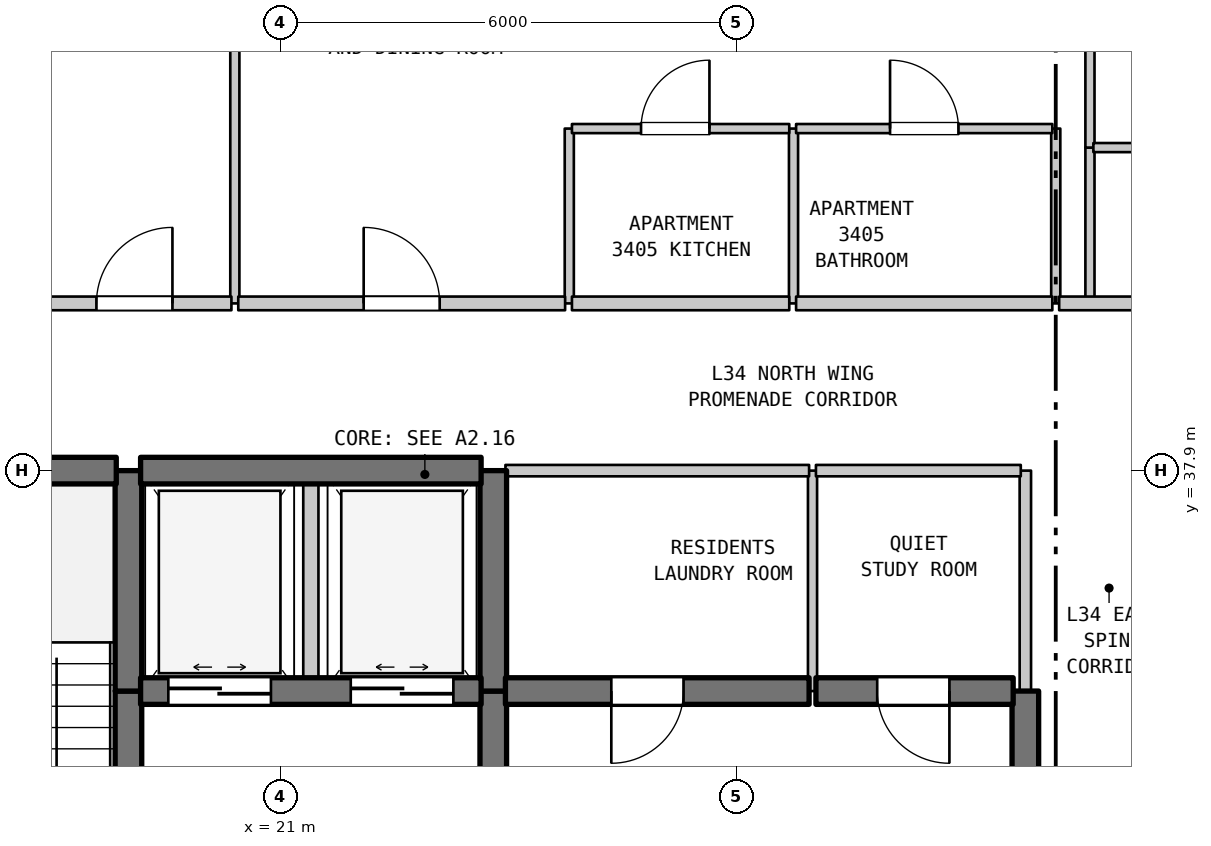
"""IFC4 building model, lengths in metres.
Left out: names, types, materials, properties, quantities, classifications, styles, units other than length and angle.
Written with IfcOpenShell. Run it as: python <this file> out.ifc"""

import sys

from ifc_helpers import new_model, si_unit, direction, frame, frame_2d, origin, place, context, subcontext, project, spatial, rectangle, extrude, element, fill, save


model = new_model("IFC4")
c1 = context("Model", 3, precision=1e-05, world=origin(), true_north=direction((0.0, 1.0)))
c2 = subcontext(c1, "Body", "Model", "MODEL_VIEW")
j1 = project(units=[si_unit("LENGTHUNIT", "METRE"), si_unit("PLANEANGLEUNIT", "RADIAN")], contexts=[c1])
p1 = place(None, origin())
s1 = spatial("IfcSite", under=j1, at=p1, CompositionType="ELEMENT")
p2 = place(p1, origin())
s2 = spatial("IfcBuilding", under=s1, at=p2, CompositionType="ELEMENT")
p3 = place(p2, frame((0.0, 0.0, 140.9)))
s3 = spatial("IfcBuildingStorey", under=s2, at=p3, CompositionType="ELEMENT", Elevation=140.9)
p4 = place(p3, frame((19.0, 29.5, 0.0), z_axis=(0.0, 0.0, 1.0), x_axis=(0.0, 1.0, 0.0)))
e1 = element("IfcWall", 1, at=p4, inside=s3, PredefinedType="SHEAR", context=c2, shape_type="SweptSolid", body=[
    extrude(rectangle(XDim=5.5, YDim=0.35, at=frame_2d((2.75, 0.0))), origin(), (0.0, 0.0, 1.0), 3.385),
])
p5 = place(p4, frame((2.025, 0.0, 0.0)))
e2 = element("IfcOpeningElement", 2, at=p5, cuts=e1, PredefinedType="OPENING", context=c2, shape_type="SweptSolid", body=[
    extrude(rectangle(XDim=1.1, YDim=2.15, at=frame_2d((0.55, 1.075))), frame((0.0, 0.185, 0.0), z_axis=(0.0, -1.0, 0.0), x_axis=(1.0, 0.0, 0.0)), (0.0, 0.0, 1.0), 0.37),
])
p6 = place(p3, frame((19.0, 35.0, 0.0), z_axis=(0.0, 0.0, 1.0), x_axis=(0.0, 1.0, 0.0)))
e3 = element("IfcWall", 3, at=p6, inside=s3, PredefinedType="SHEAR", context=c2, shape_type="SweptSolid", body=[
    extrude(rectangle(XDim=2.9, YDim=0.35, at=frame_2d((1.45, 0.0))), origin(), (0.0, 0.0, 1.0), 3.385),
])
p7 = place(p3, frame((20.4, 40.1, 0.0), z_axis=(0.0, 0.0, 1.0), x_axis=(0.0, 1.0, 0.0)))
e4 = element("IfcWall", 4, at=p7, inside=s3, PredefinedType="PARTITIONING", context=c2, shape_type="SweptSolid", body=[
    extrude(rectangle(XDim=13.79, YDim=0.12, at=frame_2d((6.895, 0.0))), origin(), (0.0, 0.0, 1.0), 3.385),
])
p8 = place(p3, frame((21.4, 35.0, 0.0), z_axis=(0.0, 0.0, 1.0), x_axis=(0.0, 1.0, 0.0)))
e5 = element("IfcWall", 5, at=p8, inside=s3, PredefinedType="STANDARD", context=c2, shape_type="SweptSolid", body=[
    extrude(rectangle(XDim=2.9, YDim=0.2, at=frame_2d((1.45, 0.0))), origin(), (0.0, 0.0, 1.0), 3.385),
])
p9 = place(p3, frame((23.8, 31.5, 0.0), z_axis=(0.0, 0.0, 1.0), x_axis=(0.0, 1.0, 0.0)))
e6 = element("IfcWall", 6, at=p9, inside=s3, PredefinedType="SHEAR", context=c2, shape_type="SweptSolid", body=[
    extrude(rectangle(XDim=3.5, YDim=0.35, at=frame_2d((1.75, 0.0))), origin(), (0.0, 0.0, 1.0), 3.385),
])
p10 = place(p9, frame((1.127, 0.0, 0.0)))
e7 = element("IfcOpeningElement", 7, at=p10, cuts=e6, PredefinedType="OPENING", context=c2, shape_type="SweptSolid", body=[
    extrude(rectangle(XDim=1.1, YDim=2.15, at=frame_2d((0.55, 1.075))), frame((0.0, 0.185, 0.0), z_axis=(0.0, -1.0, 0.0), x_axis=(1.0, 0.0, 0.0)), (0.0, 0.0, 1.0), 0.37),
])
p11 = place(p3, frame((23.8, 35.0, 0.0), z_axis=(0.0, 0.0, 1.0), x_axis=(0.0, 1.0, 0.0)))
e8 = element("IfcWall", 8, at=p11, inside=s3, PredefinedType="SHEAR", context=c2, shape_type="SweptSolid", body=[
    extrude(rectangle(XDim=2.9, YDim=0.35, at=frame_2d((1.45, 0.0))), origin(), (0.0, 0.0, 1.0), 3.385),
])
for number, where, z_axis, x_axis in (
    (9, (24.8, 40.1, 0.0), (0.0, 0.0, 1.0), (0.0, 1.0, 0.0)),
    (10, (27.75, 40.1, 0.0), (0.0, 0.0, 1.0), (0.0, 1.0, 0.0)),
):
    element("IfcWall", number, at=place(p3, frame(where, z_axis=z_axis, x_axis=x_axis)), inside=s3, PredefinedType="PARTITIONING", context=c2, shape_type="SweptSolid", body=[
        extrude(rectangle(XDim=2.3, YDim=0.12, at=frame_2d((1.15, 0.0))), origin(), (0.0, 0.0, 1.0), 3.385),
    ])
p12 = place(p3, frame((28.0, 35.0, 0.0), z_axis=(0.0, 0.0, 1.0), x_axis=(0.0, 1.0, 0.0)))
e11 = element("IfcWall", 11, at=p12, inside=s3, PredefinedType="PARTITIONING", context=c2, shape_type="SweptSolid", body=[
    extrude(rectangle(XDim=2.9, YDim=0.12, at=frame_2d((1.45, 0.0))), origin(), (0.0, 0.0, 1.0), 3.385),
])
p13 = place(p3, frame((30.8, 31.5, 0.0), z_axis=(0.0, 0.0, 1.0), x_axis=(0.0, 1.0, 0.0)))
e12 = element("IfcWall", 12, at=p13, inside=s3, PredefinedType="SHEAR", context=c2, shape_type="SweptSolid", body=[
    extrude(rectangle(XDim=3.5, YDim=0.35, at=frame_2d((1.75, 0.0))), origin(), (0.0, 0.0, 1.0), 3.385),
])
p14 = place(p13, frame((1.15, 0.0, 0.0)))
e13 = element("IfcOpeningElement", 13, at=p14, cuts=e12, PredefinedType="OPENING", context=c2, shape_type="SweptSolid", body=[
    extrude(rectangle(XDim=1.2, YDim=2.2, at=frame_2d((0.6, 1.1))), frame((0.0, 0.185, 0.0), z_axis=(0.0, -1.0, 0.0), x_axis=(1.0, 0.0, 0.0)), (0.0, 0.0, 1.0), 0.37),
])
p15 = place(p3, frame((30.8, 35.0, 0.0), z_axis=(0.0, 0.0, 1.0), x_axis=(0.0, 1.0, 0.0)))
e14 = element("IfcWall", 14, at=p15, inside=s3, PredefinedType="STANDARD", context=c2, shape_type="SweptSolid", body=[
    extrude(rectangle(XDim=2.9, YDim=0.15, at=frame_2d((1.45, 0.0))), origin(), (0.0, 0.0, 1.0), 3.385),
])
p16 = place(p3, frame((31.2, 40.1, 0.0), z_axis=(0.0, 0.0, 1.0), x_axis=(0.0, 1.0, 0.0)))
e15 = element("IfcWall", 15, at=p16, inside=s3, PredefinedType="PARTITIONING", context=c2, shape_type="SweptSolid", body=[
    extrude(rectangle(XDim=2.3, YDim=0.12, at=frame_2d((1.15, 0.0))), origin(), (0.0, 0.0, 1.0), 3.385),
])
p17 = place(p3, frame((31.65, 40.1, 0.0), z_axis=(0.0, 0.0, 1.0), x_axis=(0.0, 1.0, 0.0)))
e16 = element("IfcWall", 16, at=p17, inside=s3, PredefinedType="PARTITIONING", context=c2, shape_type="SweptSolid", body=[
    extrude(rectangle(XDim=2.05, YDim=0.12, at=frame_2d((1.025, 0.0))), origin(), (0.0, 0.0, 1.0), 3.385),
])
p18 = place(p3, frame((31.65, 42.15, 0.0), z_axis=(0.0, 0.0, 1.0), x_axis=(0.0, 1.0, 0.0)))
e17 = element("IfcWall", 17, at=p18, inside=s3, PredefinedType="PARTITIONING", context=c2, shape_type="SweptSolid", body=[
    extrude(rectangle(XDim=3.3, YDim=0.12, at=frame_2d((1.65, 0.0))), origin(), (0.0, 0.0, 1.0), 3.385),
])
p19 = place(p3, frame((19.16, 35.0, 0.0), z_axis=(0.0, 0.0, 1.0), x_axis=(1.0, 0.0, 0.0)))
e18 = element("IfcWall", 18, at=p19, inside=s3, PredefinedType="SHEAR", context=c2, shape_type="SweptSolid", body=[
    extrude(rectangle(XDim=4.48, YDim=0.35, at=frame_2d((2.24, 0.0))), origin(), (0.0, 0.0, 1.0), 3.385),
])
p20 = place(p19, frame((0.365, 0.0, 0.0)))
e19 = element("IfcOpeningElement", 19, at=p20, cuts=e18, PredefinedType="OPENING", context=c2, shape_type="SweptSolid", body=[
    extrude(rectangle(XDim=1.35, YDim=2.2, at=frame_2d((0.675, 1.1))), frame((0.0, 0.185, 0.0), z_axis=(0.0, -1.0, 0.0), x_axis=(1.0, 0.0, 0.0)), (0.0, 0.0, 1.0), 0.37),
])
p21 = place(p19, frame((2.765, 0.0, 0.0)))
e20 = element("IfcOpeningElement", 20, at=p21, cuts=e18, PredefinedType="OPENING", context=c2, shape_type="SweptSolid", body=[
    extrude(rectangle(XDim=1.35, YDim=2.2, at=frame_2d((0.675, 1.1))), frame((0.0, 0.185, 0.0), z_axis=(0.0, -1.0, 0.0), x_axis=(1.0, 0.0, 0.0)), (0.0, 0.0, 1.0), 0.37),
])
p22 = place(p3, frame((23.96, 35.0, 0.0), z_axis=(0.0, 0.0, 1.0), x_axis=(1.0, 0.0, 0.0)))
e21 = element("IfcWall", 21, at=p22, inside=s3, PredefinedType="SHEAR", context=c2, shape_type="SweptSolid", body=[
    extrude(rectangle(XDim=3.995, YDim=0.35, at=frame_2d((1.998, 0.0))), origin(), (0.0, 0.0, 1.0), 3.385),
])
p23 = place(p22, frame((1.393, 0.0, 0.0)))
e22 = element("IfcOpeningElement", 22, at=p23, cuts=e21, PredefinedType="OPENING", context=c2, shape_type="SweptSolid", body=[
    extrude(rectangle(XDim=0.95, YDim=2.15, at=frame_2d((0.475, 1.075))), frame((0.0, 0.185, 0.0), z_axis=(0.0, -1.0, 0.0), x_axis=(1.0, 0.0, 0.0)), (0.0, 0.0, 1.0), 0.37),
])
p24 = place(p3, frame((28.045, 35.0, 0.0), z_axis=(0.0, 0.0, 1.0), x_axis=(1.0, 0.0, 0.0)))
e23 = element("IfcWall", 23, at=p24, inside=s3, PredefinedType="SHEAR", context=c2, shape_type="SweptSolid", body=[
    extrude(rectangle(XDim=2.595, YDim=0.35, at=frame_2d((1.297, 0.0))), origin(), (0.0, 0.0, 1.0), 3.385),
])
p25 = place(p24, frame((0.806, 0.0, 0.0)))
e24 = element("IfcOpeningElement", 24, at=p25, cuts=e23, PredefinedType="OPENING", context=c2, shape_type="SweptSolid", body=[
    extrude(rectangle(XDim=0.95, YDim=2.15, at=frame_2d((0.475, 1.075))), frame((0.0, 0.185, 0.0), z_axis=(0.0, -1.0, 0.0), x_axis=(1.0, 0.0, 0.0)), (0.0, 0.0, 1.0), 0.37),
])
p26 = place(p3, frame((15.16, 37.9, 0.0), z_axis=(0.0, 0.0, 1.0), x_axis=(1.0, 0.0, 0.0)))
e25 = element("IfcWall", 25, at=p26, inside=s3, PredefinedType="SHEAR", context=c2, shape_type="SweptSolid", body=[
    extrude(rectangle(XDim=3.68, YDim=0.35, at=frame_2d((1.84, 0.0))), origin(), (0.0, 0.0, 1.0), 3.385),
])
p27 = place(p3, frame((19.16, 37.9, 0.0), z_axis=(0.0, 0.0, 1.0), x_axis=(1.0, 0.0, 0.0)))
e26 = element("IfcWall", 26, at=p27, inside=s3, PredefinedType="SHEAR", context=c2, shape_type="SweptSolid", body=[
    extrude(rectangle(XDim=4.48, YDim=0.35, at=frame_2d((2.24, 0.0))), origin(), (0.0, 0.0, 1.0), 3.385),
])
p28 = place(p3, frame((23.96, 37.9, 0.0), z_axis=(0.0, 0.0, 1.0), x_axis=(1.0, 0.0, 0.0)))
e27 = element("IfcWall", 27, at=p28, inside=s3, PredefinedType="STANDARD", context=c2, shape_type="SweptSolid", body=[
    extrude(rectangle(XDim=3.995, YDim=0.15, at=frame_2d((1.998, 0.0))), origin(), (0.0, 0.0, 1.0), 2.885),
])
p29 = place(p3, frame((28.045, 37.9, 0.0), z_axis=(0.0, 0.0, 1.0), x_axis=(1.0, 0.0, 0.0)))
e28 = element("IfcWall", 28, at=p29, inside=s3, PredefinedType="STANDARD", context=c2, shape_type="SweptSolid", body=[
    extrude(rectangle(XDim=2.695, YDim=0.15, at=frame_2d((1.348, 0.0))), origin(), (0.0, 0.0, 1.0), 2.885),
])
p30 = place(p3, frame((17.945, 40.1, 0.0), z_axis=(0.0, 0.0, 1.0), x_axis=(1.0, 0.0, 0.0)))
e29 = element("IfcWall", 29, at=p30, inside=s3, PredefinedType="STANDARD", context=c2, shape_type="SweptSolid", body=[
    extrude(rectangle(XDim=2.41, YDim=0.18, at=frame_2d((1.205, 0.0))), origin(), (0.0, 0.0, 1.0), 3.385),
])
p31 = place(p30, frame((0.634, 0.0, 0.0)))
e30 = element("IfcOpeningElement", 30, at=p31, cuts=e29, PredefinedType="OPENING", context=c2, shape_type="SweptSolid", body=[
    extrude(rectangle(XDim=1.0, YDim=2.15, at=frame_2d((0.5, 1.075))), frame((0.0, 0.1, 0.0), z_axis=(0.0, -1.0, 0.0), x_axis=(1.0, 0.0, 0.0)), (0.0, 0.0, 1.0), 0.2),
])
p32 = place(p3, frame((20.445, 40.1, 0.0), z_axis=(0.0, 0.0, 1.0), x_axis=(1.0, 0.0, 0.0)))
e31 = element("IfcWall", 31, at=p32, inside=s3, PredefinedType="STANDARD", context=c2, shape_type="SweptSolid", body=[
    extrude(rectangle(XDim=4.3, YDim=0.18, at=frame_2d((2.15, 0.0))), origin(), (0.0, 0.0, 1.0), 3.385),
])
p33 = place(p32, frame((1.65, 0.0, 0.0)))
e32 = element("IfcOpeningElement", 32, at=p33, cuts=e31, PredefinedType="OPENING", context=c2, shape_type="SweptSolid", body=[
    extrude(rectangle(XDim=1.0, YDim=2.15, at=frame_2d((0.5, 1.075))), frame((0.0, 0.1, 0.0), z_axis=(0.0, -1.0, 0.0), x_axis=(1.0, 0.0, 0.0)), (0.0, 0.0, 1.0), 0.2),
])
p34 = place(p3, frame((24.835, 40.1, 0.0), z_axis=(0.0, 0.0, 1.0), x_axis=(1.0, 0.0, 0.0)))
e33 = element("IfcWall", 33, at=p34, inside=s3, PredefinedType="STANDARD", context=c2, shape_type="SweptSolid", body=[
    extrude(rectangle(XDim=2.859, YDim=0.18, at=frame_2d((1.43, 0.0))), origin(), (0.0, 0.0, 1.0), 3.385),
])
p35 = place(p3, frame((27.784, 40.1, 0.0), z_axis=(0.0, 0.0, 1.0), x_axis=(1.0, 0.0, 0.0)))
e34 = element("IfcWall", 34, at=p35, inside=s3, PredefinedType="STANDARD", context=c2, shape_type="SweptSolid", body=[
    extrude(rectangle(XDim=3.371, YDim=0.18, at=frame_2d((1.686, 0.0))), origin(), (0.0, 0.0, 1.0), 3.385),
])
p36 = place(p3, frame((31.245, 40.1, 0.0), z_axis=(0.0, 0.0, 1.0), x_axis=(1.0, 0.0, 0.0)))
e35 = element("IfcWall", 35, at=p36, inside=s3, PredefinedType="STANDARD", context=c2, shape_type="SweptSolid", body=[
    extrude(rectangle(XDim=5.545, YDim=0.18, at=frame_2d((2.772, 0.0))), origin(), (0.0, 0.0, 1.0), 3.385),
])
p37 = place(p36, frame((2.435, 0.0, 0.0)))
e36 = element("IfcOpeningElement", 36, at=p37, cuts=e35, PredefinedType="OPENING", context=c2, shape_type="SweptSolid", body=[
    extrude(rectangle(XDim=1.0, YDim=2.15, at=frame_2d((0.5, 1.075))), frame((0.0, 0.1, 0.0), z_axis=(0.0, -1.0, 0.0), x_axis=(1.0, 0.0, 0.0)), (0.0, 0.0, 1.0), 0.2),
])
p38 = place(p3, frame((31.695, 42.15, 0.0), z_axis=(0.0, 0.0, 1.0), x_axis=(1.0, 0.0, 0.0)))
e37 = element("IfcWall", 37, at=p38, inside=s3, PredefinedType="PARTITIONING", context=c2, shape_type="SweptSolid", body=[
    extrude(rectangle(XDim=2.16, YDim=0.12, at=frame_2d((1.08, 0.0))), origin(), (0.0, 0.0, 1.0), 3.385),
])
p39 = place(p38, frame((0.553, 0.0, 0.0)))
e38 = element("IfcOpeningElement", 38, at=p39, cuts=e37, PredefinedType="OPENING", context=c2, shape_type="SweptSolid", body=[
    extrude(rectangle(XDim=0.9, YDim=2.15, at=frame_2d((0.45, 1.075))), frame((0.0, 0.07, 0.0), z_axis=(0.0, -1.0, 0.0), x_axis=(1.0, 0.0, 0.0)), (0.0, 0.0, 1.0), 0.14),
])
p40 = place(p3, frame((24.835, 42.4, 0.0), z_axis=(0.0, 0.0, 1.0), x_axis=(1.0, 0.0, 0.0)))
e39 = element("IfcWall", 39, at=p40, inside=s3, PredefinedType="PARTITIONING", context=c2, shape_type="SweptSolid", body=[
    extrude(rectangle(XDim=2.859, YDim=0.12, at=frame_2d((1.43, 0.0))), origin(), (0.0, 0.0, 1.0), 3.385),
])
p41 = place(p40, frame((0.909, 0.0, 0.0)))
e40 = element("IfcOpeningElement", 40, at=p41, cuts=e39, PredefinedType="OPENING", context=c2, shape_type="SweptSolid", body=[
    extrude(rectangle(XDim=0.9, YDim=2.15, at=frame_2d((0.45, 1.075))), frame((0.0, 0.07, 0.0), z_axis=(0.0, -1.0, 0.0), x_axis=(1.0, 0.0, 0.0)), (0.0, 0.0, 1.0), 0.14),
])
p42 = place(p3, frame((27.784, 42.4, 0.0), z_axis=(0.0, 0.0, 1.0), x_axis=(1.0, 0.0, 0.0)))
e41 = element("IfcWall", 41, at=p42, inside=s3, PredefinedType="PARTITIONING", context=c2, shape_type="SweptSolid", body=[
    extrude(rectangle(XDim=3.371, YDim=0.12, at=frame_2d((1.686, 0.0))), origin(), (0.0, 0.0, 1.0), 3.385),
])
p43 = place(p42, frame((1.236, 0.0, 0.0)))
e42 = element("IfcOpeningElement", 42, at=p43, cuts=e41, PredefinedType="OPENING", context=c2, shape_type="SweptSolid", body=[
    extrude(rectangle(XDim=0.9, YDim=2.1, at=frame_2d((0.45, 1.05))), frame((0.0, 0.07, 0.0), z_axis=(0.0, -1.0, 0.0), x_axis=(1.0, 0.0, 0.0)), (0.0, 0.0, 1.0), 0.14),
])
p44 = place(p20, origin())
e43 = element("IfcDoor", 43, at=p44, inside=s3, OperationType="DOUBLE_DOOR_SLIDING", PredefinedType="DOOR", context=c2, shape_type="SweptSolid", body=[
    extrude(rectangle(XDim=1.35, YDim=2.2, at=frame_2d((0.675, 1.1))), frame((0.0, 0.025, 0.0), z_axis=(0.0, -1.0, 0.0), x_axis=(1.0, 0.0, 0.0)), (0.0, 0.0, 1.0), 0.05),
])
fill(e19, e43)
p45 = place(p21, origin())
e44 = element("IfcDoor", 44, at=p45, inside=s3, OperationType="DOUBLE_DOOR_SLIDING", PredefinedType="DOOR", context=c2, shape_type="SweptSolid", body=[
    extrude(rectangle(XDim=1.35, YDim=2.2, at=frame_2d((0.675, 1.1))), frame((0.0, 0.025, 0.0), z_axis=(0.0, -1.0, 0.0), x_axis=(1.0, 0.0, 0.0)), (0.0, 0.0, 1.0), 0.05),
])
fill(e20, e44)
p46 = place(p23, frame((0.95, 0.0, 0.0), z_axis=(0.0, 0.0, 1.0), x_axis=(-1.0, 0.0, 0.0)))
e45 = element("IfcDoor", 45, at=p46, inside=s3, OperationType="SINGLE_SWING_LEFT", PredefinedType="DOOR", context=c2, shape_type="SweptSolid", body=[
    extrude(rectangle(XDim=0.95, YDim=2.15, at=frame_2d((0.475, 1.075))), frame((0.0, 0.025, 0.0), z_axis=(0.0, -1.0, 0.0), x_axis=(1.0, 0.0, 0.0)), (0.0, 0.0, 1.0), 0.05),
])
fill(e22, e45)
p47 = place(p25, frame((0.95, 0.0, 0.0), z_axis=(0.0, 0.0, 1.0), x_axis=(-1.0, 0.0, 0.0)))
e46 = element("IfcDoor", 46, at=p47, inside=s3, OperationType="SINGLE_SWING_RIGHT", PredefinedType="DOOR", context=c2, shape_type="SweptSolid", body=[
    extrude(rectangle(XDim=0.95, YDim=2.15, at=frame_2d((0.475, 1.075))), frame((0.0, 0.025, 0.0), z_axis=(0.0, -1.0, 0.0), x_axis=(1.0, 0.0, 0.0)), (0.0, 0.0, 1.0), 0.05),
])
fill(e24, e46)
p48 = place(p31, origin())
e47 = element("IfcDoor", 47, at=p48, inside=s3, OperationType="SINGLE_SWING_RIGHT", PredefinedType="DOOR", context=c2, shape_type="SweptSolid", body=[
    extrude(rectangle(XDim=1.0, YDim=2.15, at=frame_2d((0.5, 1.075))), frame((0.0, 0.025, 0.0), z_axis=(0.0, -1.0, 0.0), x_axis=(1.0, 0.0, 0.0)), (0.0, 0.0, 1.0), 0.05),
])
fill(e30, e47)
p49 = place(p33, origin())
e48 = element("IfcDoor", 48, at=p49, inside=s3, OperationType="SINGLE_SWING_LEFT", PredefinedType="DOOR", context=c2, shape_type="SweptSolid", body=[
    extrude(rectangle(XDim=1.0, YDim=2.15, at=frame_2d((0.5, 1.075))), frame((0.0, 0.025, 0.0), z_axis=(0.0, -1.0, 0.0), x_axis=(1.0, 0.0, 0.0)), (0.0, 0.0, 1.0), 0.05),
])
fill(e32, e48)
p50 = place(p41, origin())
e49 = element("IfcDoor", 49, at=p50, inside=s3, OperationType="SINGLE_SWING_RIGHT", PredefinedType="DOOR", context=c2, shape_type="SweptSolid", body=[
    extrude(rectangle(XDim=0.9, YDim=2.15, at=frame_2d((0.45, 1.075))), frame((0.0, 0.025, 0.0), z_axis=(0.0, -1.0, 0.0), x_axis=(1.0, 0.0, 0.0)), (0.0, 0.0, 1.0), 0.05),
])
fill(e40, e49)
p51 = place(p43, origin())
e50 = element("IfcDoor", 50, at=p51, inside=s3, OperationType="SINGLE_SWING_LEFT", PredefinedType="DOOR", context=c2, shape_type="SweptSolid", body=[
    extrude(rectangle(XDim=0.9, YDim=2.1, at=frame_2d((0.45, 1.05))), frame((0.0, 0.025, 0.0), z_axis=(0.0, -1.0, 0.0), x_axis=(1.0, 0.0, 0.0)), (0.0, 0.0, 1.0), 0.05),
])
fill(e42, e50)
save(model, sys.argv[1])
